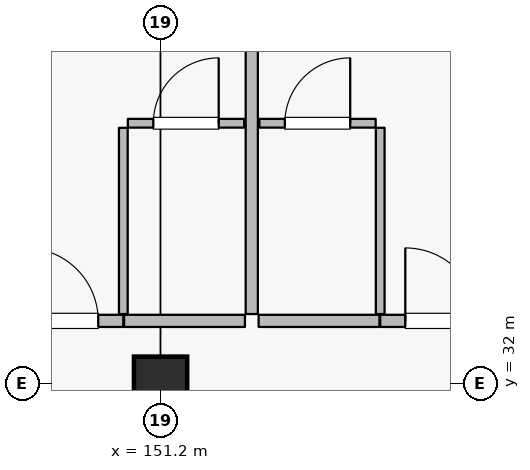
"""IFC4 building model, lengths in metres.
Left out: names, types, materials, properties, quantities, classifications, styles, units other than length and angle.
Written with IfcOpenShell. Run it as: python <this file> out.ifc"""

import sys

from ifc_helpers import new_model, si_unit, direction, frame, frame_2d, origin, origin_2d, place, context, subcontext, project, spatial, rectangle, extrude, element, fill, save


model = new_model("IFC4")
c1 = context("Model", 3, precision=1e-05, world=origin(), true_north=direction((0.0, 1.0)))
c2 = subcontext(c1, "Body", "Model", "MODEL_VIEW")
j1 = project(units=[si_unit("LENGTHUNIT", "METRE"), si_unit("PLANEANGLEUNIT", "RADIAN")], contexts=[c1])
p1 = place(None, origin())
s1 = spatial("IfcSite", under=j1, at=p1, CompositionType="ELEMENT")
p2 = place(p1, origin())
s2 = spatial("IfcBuilding", under=s1, at=p2, CompositionType="ELEMENT")
p3 = place(p2, frame((0.0, 0.0, 25.2)))
s3 = spatial("IfcBuildingStorey", under=s2, at=p3, CompositionType="ELEMENT", Elevation=25.2)
p4 = place(p3, frame((151.2, 32.0, 0.0), z_axis=(0.0, 0.0, 1.0), x_axis=(1.0, 0.0, 0.0)))
e1 = element("IfcColumn", 1, at=p4, inside=s3, PredefinedType="COLUMN", context=c2, shape_type="SweptSolid", body=[
    extrude(rectangle(XDim=0.7, YDim=0.7, at=origin_2d()), origin(), (0.0, 0.0, 1.0), 3.6),
])
p5 = place(p3, frame((143.2, 32.381, 0.0), z_axis=(0.0, 0.0, 1.0), x_axis=(0.724156739794, 0.689635422677, 0.0)))
e2 = element("IfcWall", 2, at=p5, inside=s3, PredefinedType="SOLIDWALL", context=c2, shape_type="SweptSolid", body=[
    extrude(rectangle(XDim=10.495, YDim=0.24, at=frame_2d((5.248, 0.0))), origin(), (0.0, 0.0, 1.0), 2.93),
])
p6 = place(p5, frame((0.788, 0.0, 0.8)))
e3 = element("IfcOpeningElement", 3, at=p6, cuts=e2, PredefinedType="OPENING", context=c2, shape_type="SweptSolid", body=[
    extrude(rectangle(XDim=1.6, YDim=1.6, at=frame_2d((0.8, 0.8))), frame((0.0, 0.13, 0.0), z_axis=(0.0, -1.0, 0.0), x_axis=(1.0, 0.0, 0.0)), (0.0, 0.0, 1.0), 0.26),
])
p7 = place(p5, frame((4.862, 0.0, 0.8)))
e4 = element("IfcOpeningElement", 4, at=p7, cuts=e2, PredefinedType="OPENING", context=c2, shape_type="SweptSolid", body=[
    extrude(rectangle(XDim=1.6, YDim=1.6, at=frame_2d((0.8, 0.8))), frame((0.0, 0.13, 0.0), z_axis=(0.0, -1.0, 0.0), x_axis=(1.0, 0.0, 0.0)), (0.0, 0.0, 1.0), 0.26),
])
p8 = place(p5, frame((8.521, 0.0, 0.8)))
e5 = element("IfcOpeningElement", 5, at=p8, cuts=e2, PredefinedType="OPENING", context=c2, shape_type="SweptSolid", body=[
    extrude(rectangle(XDim=1.6, YDim=1.6, at=frame_2d((0.8, 0.8))), frame((0.0, 0.13, 0.0), z_axis=(0.0, -1.0, 0.0), x_axis=(1.0, 0.0, 0.0)), (0.0, 0.0, 1.0), 0.26),
])
p9 = place(p3, frame((149.09, 32.82, 0.0), z_axis=(0.0, 0.0, 1.0), x_axis=(1.0, 0.0, 0.0)))
e6 = element("IfcWall", 6, at=p9, inside=s3, PredefinedType="PARTITIONING", context=c2, shape_type="SweptSolid", body=[
    extrude(rectangle(XDim=1.62, YDim=0.16, at=frame_2d((0.81, 0.0))), origin(), (0.0, 0.0, 1.0), 3.335),
])
p10 = place(p9, frame((0.33, 0.0, 0.0)))
e7 = element("IfcOpeningElement", 7, at=p10, cuts=e6, PredefinedType="OPENING", context=c2, shape_type="SweptSolid", body=[
    extrude(rectangle(XDim=0.96, YDim=2.2, at=frame_2d((0.48, 1.1))), frame((0.0, 0.09, 0.0), z_axis=(0.0, -1.0, 0.0), x_axis=(1.0, 0.0, 0.0)), (0.0, 0.0, 1.0), 0.18),
])
p11 = place(p3, frame((150.72, 32.82, 0.0), z_axis=(0.0, 0.0, 1.0), x_axis=(1.0, 0.0, 0.0)))
e8 = element("IfcWall", 8, at=p11, inside=s3, PredefinedType="PARTITIONING", context=c2, shape_type="SweptSolid", body=[
    extrude(rectangle(XDim=1.59, YDim=0.16, at=frame_2d((0.795, 0.0))), origin(), (0.0, 0.0, 1.0), 3.335),
])
p12 = place(p3, frame((150.71, 32.91, 0.0), z_axis=(0.0, 0.0, 1.0), x_axis=(0.0, 1.0, 0.0)))
e9 = element("IfcWall", 9, at=p12, inside=s3, PredefinedType="PARTITIONING", context=c2, shape_type="SweptSolid", body=[
    extrude(rectangle(XDim=2.45, YDim=0.115, at=frame_2d((1.225, 0.0))), origin(), (0.0, 0.0, 1.0), 3.335),
])
p13 = place(p3, frame((150.77, 35.42, 0.0), z_axis=(0.0, 0.0, 1.0), x_axis=(1.0, 0.0, 0.0)))
e10 = element("IfcWall", 10, at=p13, inside=s3, PredefinedType="PARTITIONING", context=c2, shape_type="SweptSolid", body=[
    extrude(rectangle(XDim=1.53, YDim=0.115, at=frame_2d((0.765, 0.0))), origin(), (0.0, 0.0, 1.0), 3.335),
])
p14 = place(p13, frame((0.335, 0.0, 0.0)))
e11 = element("IfcOpeningElement", 11, at=p14, cuts=e10, PredefinedType="OPENING", context=c2, shape_type="SweptSolid", body=[
    extrude(rectangle(XDim=0.86, YDim=2.12, at=frame_2d((0.43, 1.06))), frame((0.0, 0.067, 0.0), z_axis=(0.0, -1.0, 0.0), x_axis=(1.0, 0.0, 0.0)), (0.0, 0.0, 1.0), 0.135),
])
p15 = place(p3, frame((152.49, 32.82, 0.0), z_axis=(0.0, 0.0, 1.0), x_axis=(1.0, 0.0, 0.0)))
e12 = element("IfcWall", 12, at=p15, inside=s3, PredefinedType="PARTITIONING", context=c2, shape_type="SweptSolid", body=[
    extrude(rectangle(XDim=1.59, YDim=0.16, at=frame_2d((0.795, 0.0))), origin(), (0.0, 0.0, 1.0), 3.335),
])
p16 = place(p3, frame((154.09, 32.82, 0.0), z_axis=(0.0, 0.0, 1.0), x_axis=(1.0, 0.0, 0.0)))
e13 = element("IfcWall", 13, at=p16, inside=s3, PredefinedType="PARTITIONING", context=c2, shape_type="SweptSolid", body=[
    extrude(rectangle(XDim=1.62, YDim=0.16, at=frame_2d((0.81, 0.0))), origin(), (0.0, 0.0, 1.0), 3.335),
])
p17 = place(p16, frame((0.33, 0.0, 0.0)))
e14 = element("IfcOpeningElement", 14, at=p17, cuts=e13, PredefinedType="OPENING", context=c2, shape_type="SweptSolid", body=[
    extrude(rectangle(XDim=0.96, YDim=2.2, at=frame_2d((0.48, 1.1))), frame((0.0, 0.09, 0.0), z_axis=(0.0, -1.0, 0.0), x_axis=(1.0, 0.0, 0.0)), (0.0, 0.0, 1.0), 0.18),
])
p18 = place(p3, frame((154.09, 32.91, 0.0), z_axis=(0.0, 0.0, 1.0), x_axis=(0.0, 1.0, 0.0)))
e15 = element("IfcWall", 15, at=p18, inside=s3, PredefinedType="PARTITIONING", context=c2, shape_type="SweptSolid", body=[
    extrude(rectangle(XDim=2.45, YDim=0.115, at=frame_2d((1.225, 0.0))), origin(), (0.0, 0.0, 1.0), 3.335),
])
p19 = place(p3, frame((152.5, 35.42, 0.0), z_axis=(0.0, 0.0, 1.0), x_axis=(1.0, 0.0, 0.0)))
e16 = element("IfcWall", 16, at=p19, inside=s3, PredefinedType="PARTITIONING", context=c2, shape_type="SweptSolid", body=[
    extrude(rectangle(XDim=1.53, YDim=0.115, at=frame_2d((0.765, 0.0))), origin(), (0.0, 0.0, 1.0), 3.335),
])
p20 = place(p19, frame((0.335, 0.0, 0.0)))
e17 = element("IfcOpeningElement", 17, at=p20, cuts=e16, PredefinedType="OPENING", context=c2, shape_type="SweptSolid", body=[
    extrude(rectangle(XDim=0.86, YDim=2.12, at=frame_2d((0.43, 1.06))), frame((0.0, 0.067, 0.0), z_axis=(0.0, -1.0, 0.0), x_axis=(1.0, 0.0, 0.0)), (0.0, 0.0, 1.0), 0.135),
])
p21 = place(p3, frame((152.4, 32.91, 0.0), z_axis=(0.0, 0.0, 1.0), x_axis=(0.0, 1.0, 0.0)))
e18 = element("IfcWall", 18, at=p21, inside=s3, PredefinedType="PARTITIONING", context=c2, shape_type="SweptSolid", body=[
    extrude(rectangle(XDim=6.75, YDim=0.16, at=frame_2d((3.375, 0.0))), origin(), (0.0, 0.0, 1.0), 3.335),
])
p22 = place(p10, origin())
e19 = element("IfcDoor", 19, at=p22, inside=s3, OperationType="SINGLE_SWING_LEFT", PredefinedType="DOOR", context=c2, shape_type="SweptSolid", body=[
    extrude(rectangle(XDim=0.96, YDim=2.2, at=frame_2d((0.48, 1.1))), frame((0.0, 0.025, 0.0), z_axis=(0.0, -1.0, 0.0), x_axis=(1.0, 0.0, 0.0)), (0.0, 0.0, 1.0), 0.05),
])
fill(e7, e19)
p23 = place(p14, origin())
e20 = element("IfcDoor", 20, at=p23, inside=s3, OperationType="SINGLE_SWING_RIGHT", PredefinedType="DOOR", context=c2, shape_type="SweptSolid", body=[
    extrude(rectangle(XDim=0.86, YDim=2.12, at=frame_2d((0.43, 1.06))), frame((0.0, 0.025, 0.0), z_axis=(0.0, -1.0, 0.0), x_axis=(1.0, 0.0, 0.0)), (0.0, 0.0, 1.0), 0.05),
])
fill(e11, e20)
p24 = place(p17, origin())
e21 = element("IfcDoor", 21, at=p24, inside=s3, OperationType="SINGLE_SWING_LEFT", PredefinedType="DOOR", context=c2, shape_type="SweptSolid", body=[
    extrude(rectangle(XDim=0.96, YDim=2.2, at=frame_2d((0.48, 1.1))), frame((0.0, 0.025, 0.0), z_axis=(0.0, -1.0, 0.0), x_axis=(1.0, 0.0, 0.0)), (0.0, 0.0, 1.0), 0.05),
])
fill(e14, e21)
p25 = place(p20, origin())
e22 = element("IfcDoor", 22, at=p25, inside=s3, OperationType="SINGLE_SWING_RIGHT", PredefinedType="DOOR", context=c2, shape_type="SweptSolid", body=[
    extrude(rectangle(XDim=0.86, YDim=2.12, at=frame_2d((0.43, 1.06))), frame((0.0, 0.025, 0.0), z_axis=(0.0, -1.0, 0.0), x_axis=(1.0, 0.0, 0.0)), (0.0, 0.0, 1.0), 0.05),
])
fill(e17, e22)
save(model, sys.argv[1])
